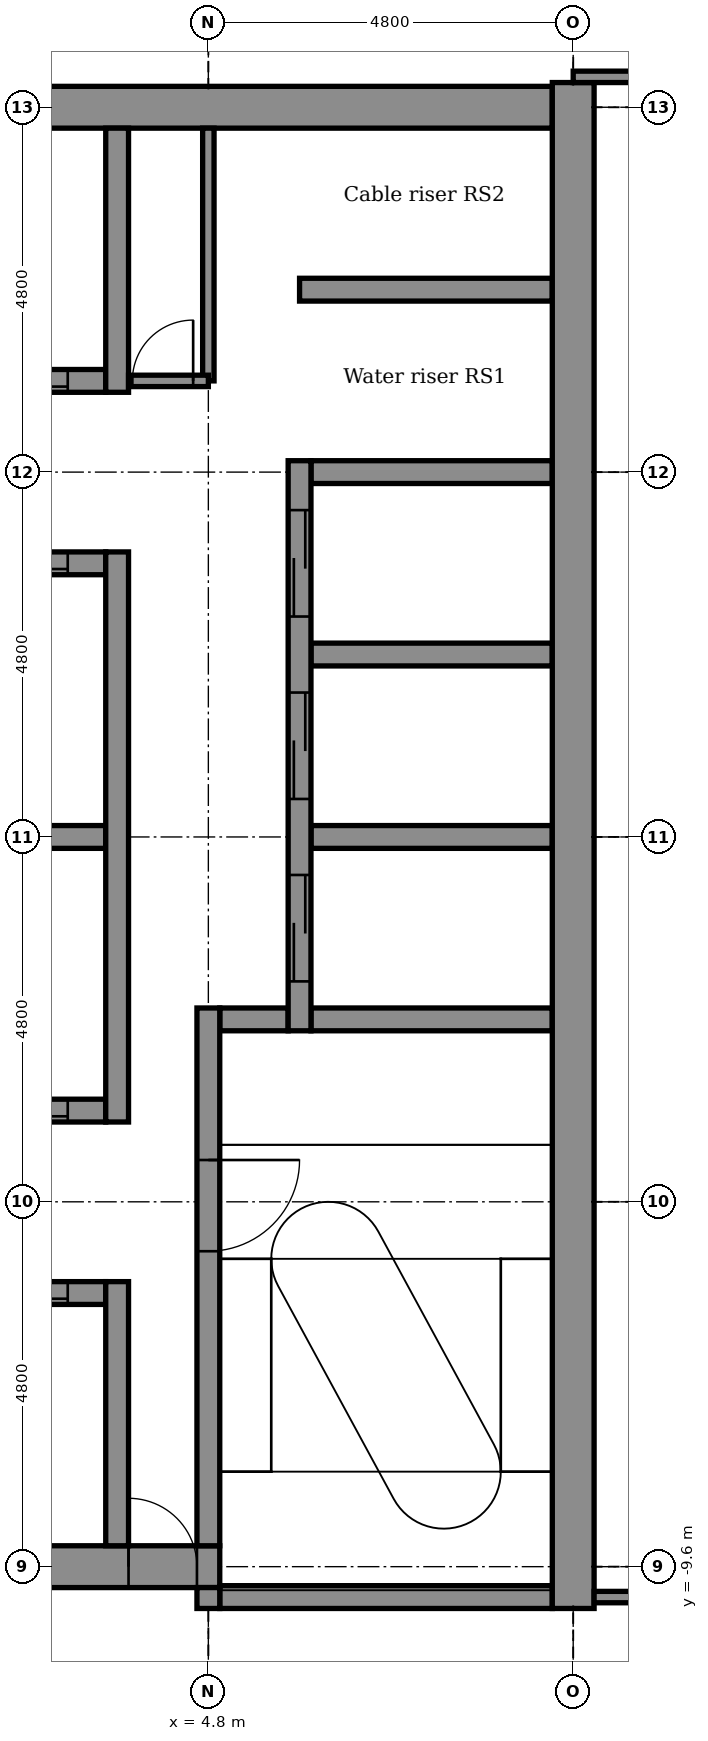
"""IFC4 building model, lengths in metres.
Left out: names, types, materials, properties, quantities, classifications, styles, units other than length and angle.
Written with IfcOpenShell. Run it as: python <this file> out.ifc"""

import sys

from ifc_helpers import new_model, si_unit, direction, frame, frame_2d, origin, place, context, subcontext, project, spatial, rectangle, extrude, element, fill, save


model = new_model("IFC4")
c1 = context("Model", 3, precision=1e-05, world=origin(), true_north=direction((0.0, 1.0)))
c2 = subcontext(c1, "Body", "Model", "MODEL_VIEW")
j1 = project(units=[si_unit("LENGTHUNIT", "METRE"), si_unit("PLANEANGLEUNIT", "RADIAN")], contexts=[c1])
p1 = place(None, origin())
s1 = spatial("IfcSite", under=j1, at=p1, CompositionType="ELEMENT")
p2 = place(p1, origin())
s2 = spatial("IfcBuilding", under=s1, at=p2, CompositionType="ELEMENT")
p3 = place(p2, frame((0.0, 0.0, 226.7)))
s3 = spatial("IfcBuildingStorey", under=s2, at=p3, CompositionType="ELEMENT", Elevation=226.7)
p4 = place(p3, frame((4.95, -10.0, -0.15), z_axis=(0.0, 0.0, 1.0), x_axis=(1.0, 0.0, 0.0)))
e1 = element("IfcWall", 1, at=p4, inside=s3, PredefinedType="STANDARD", context=c2, shape_type="SweptSolid", body=[
    extrude(rectangle(XDim=4.375, YDim=0.3, at=frame_2d((2.188, 0.0))), origin(), (0.0, 0.0, 1.0), 3.9),
])
p5 = place(p3, frame((-5.25, -9.6, -0.15), z_axis=(0.0, 0.0, 1.0), x_axis=(1.0, 0.0, 0.0)))
e2 = element("IfcWall", 2, at=p5, inside=s3, PredefinedType="SHEAR", context=c2, shape_type="SweptSolid", body=[
    extrude(rectangle(XDim=10.2, YDim=0.55, at=frame_2d((5.1, 0.0))), origin(), (0.0, 0.0, 1.0), 3.9),
])
p6 = place(p5, frame((9.0, 0.0, 0.15)))
e3 = element("IfcOpeningElement", 3, at=p6, cuts=e2, PredefinedType="OPENING", context=c2, shape_type="SweptSolid", body=[
    extrude(rectangle(XDim=0.9, YDim=2.1, at=frame_2d((0.45, 1.05))), frame((0.0, 0.285, 0.0), z_axis=(0.0, -1.0, 0.0), x_axis=(1.0, 0.0, 0.0)), (0.0, 0.0, 1.0), 0.57),
])
p7 = place(p3, frame((1.35, -6.0, -0.15), z_axis=(0.0, 0.0, 1.0), x_axis=(1.0, 0.0, 0.0)))
e4 = element("IfcWall", 4, at=p7, inside=s3, PredefinedType="STANDARD", context=c2, shape_type="SweptSolid", body=[
    extrude(rectangle(XDim=2.1, YDim=0.3, at=frame_2d((1.05, 0.0))), origin(), (0.0, 0.0, 1.0), 3.9),
])
p8 = place(p7, frame((0.5, 0.0, 0.15)))
e5 = element("IfcOpeningElement", 5, at=p8, cuts=e4, PredefinedType="OPENING", context=c2, shape_type="SweptSolid", body=[
    extrude(rectangle(XDim=1.1, YDim=2.1, at=frame_2d((0.55, 1.05))), frame((0.0, 0.16, 0.0), z_axis=(0.0, -1.0, 0.0), x_axis=(1.0, 0.0, 0.0)), (0.0, 0.0, 1.0), 0.32),
])
p9 = place(p3, frame((1.35, -3.6, -0.15), z_axis=(0.0, 0.0, 1.0), x_axis=(1.0, 0.0, 0.0)))
e6 = element("IfcWall", 6, at=p9, inside=s3, PredefinedType="STANDARD", context=c2, shape_type="SweptSolid", body=[
    extrude(rectangle(XDim=2.1, YDim=0.3, at=frame_2d((1.05, 0.0))), origin(), (0.0, 0.0, 1.0), 3.9),
])
p10 = place(p9, frame((0.5, 0.0, 0.15)))
e7 = element("IfcOpeningElement", 7, at=p10, cuts=e6, PredefinedType="OPENING", context=c2, shape_type="SweptSolid", body=[
    extrude(rectangle(XDim=1.1, YDim=2.1, at=frame_2d((0.55, 1.05))), frame((0.0, 0.16, 0.0), z_axis=(0.0, -1.0, 0.0), x_axis=(1.0, 0.0, 0.0)), (0.0, 0.0, 1.0), 0.32),
])
p11 = place(p3, frame((4.95, -2.4, -0.15), z_axis=(0.0, 0.0, 1.0), x_axis=(1.0, 0.0, 0.0)))
e8 = element("IfcWall", 8, at=p11, inside=s3, PredefinedType="STANDARD", context=c2, shape_type="SweptSolid", body=[
    extrude(rectangle(XDim=0.9, YDim=0.3, at=frame_2d((0.45, 0.0))), origin(), (0.0, 0.0, 1.0), 3.9),
])
p12 = place(p3, frame((6.15, -2.4, -0.15), z_axis=(0.0, 0.0, 1.0), x_axis=(1.0, 0.0, 0.0)))
e9 = element("IfcWall", 9, at=p12, inside=s3, PredefinedType="STANDARD", context=c2, shape_type="SweptSolid", body=[
    extrude(rectangle(XDim=3.175, YDim=0.3, at=frame_2d((1.587, 0.0))), origin(), (0.0, 0.0, 1.0), 3.9),
])
p13 = place(p3, frame((1.35, 0.0, -0.15), z_axis=(0.0, 0.0, 1.0), x_axis=(1.0, 0.0, 0.0)))
e10 = element("IfcWall", 10, at=p13, inside=s3, PredefinedType="STANDARD", context=c2, shape_type="SweptSolid", body=[
    extrude(rectangle(XDim=2.1, YDim=0.3, at=frame_2d((1.05, 0.0))), origin(), (0.0, 0.0, 1.0), 3.9),
])
for number, where, z_axis, x_axis in (
    (11, (6.15, 0.0, -0.15), (0.0, 0.0, 1.0), (1.0, 0.0, 0.0)),
    (12, (6.15, 2.4, -0.15), (0.0, 0.0, 1.0), (1.0, 0.0, 0.0)),
):
    element("IfcWall", number, at=place(p3, frame(where, z_axis=z_axis, x_axis=x_axis)), inside=s3, PredefinedType="STANDARD", context=c2, shape_type="SweptSolid", body=[
        extrude(rectangle(XDim=3.175, YDim=0.3, at=frame_2d((1.587, 0.0))), origin(), (0.0, 0.0, 1.0), 3.9),
    ])
p14 = place(p3, frame((1.35, 3.6, -0.15), z_axis=(0.0, 0.0, 1.0), x_axis=(1.0, 0.0, 0.0)))
e13 = element("IfcWall", 13, at=p14, inside=s3, PredefinedType="STANDARD", context=c2, shape_type="SweptSolid", body=[
    extrude(rectangle(XDim=2.1, YDim=0.3, at=frame_2d((1.05, 0.0))), origin(), (0.0, 0.0, 1.0), 3.9),
])
p15 = place(p14, frame((0.5, 0.0, 0.15)))
e14 = element("IfcOpeningElement", 14, at=p15, cuts=e13, PredefinedType="OPENING", context=c2, shape_type="SweptSolid", body=[
    extrude(rectangle(XDim=1.1, YDim=2.1, at=frame_2d((0.55, 1.05))), frame((0.0, 0.16, 0.0), z_axis=(0.0, -1.0, 0.0), x_axis=(1.0, 0.0, 0.0)), (0.0, 0.0, 1.0), 0.32),
])
p16 = place(p3, frame((6.15, 4.8, -0.15), z_axis=(0.0, 0.0, 1.0), x_axis=(1.0, 0.0, 0.0)))
e15 = element("IfcWall", 15, at=p16, inside=s3, PredefinedType="STANDARD", context=c2, shape_type="SweptSolid", body=[
    extrude(rectangle(XDim=3.175, YDim=0.3, at=frame_2d((1.587, 0.0))), origin(), (0.0, 0.0, 1.0), 3.9),
])
p17 = place(p3, frame((1.35, 6.0, -0.15), z_axis=(0.0, 0.0, 1.0), x_axis=(1.0, 0.0, 0.0)))
e16 = element("IfcWall", 16, at=p17, inside=s3, PredefinedType="STANDARD", context=c2, shape_type="SweptSolid", body=[
    extrude(rectangle(XDim=2.1, YDim=0.3, at=frame_2d((1.05, 0.0))), origin(), (0.0, 0.0, 1.0), 3.9),
])
p18 = place(p17, frame((0.5, 0.0, 0.15)))
e17 = element("IfcOpeningElement", 17, at=p18, cuts=e16, PredefinedType="OPENING", context=c2, shape_type="SweptSolid", body=[
    extrude(rectangle(XDim=1.1, YDim=2.1, at=frame_2d((0.55, 1.05))), frame((0.0, 0.16, 0.0), z_axis=(0.0, -1.0, 0.0), x_axis=(1.0, 0.0, 0.0)), (0.0, 0.0, 1.0), 0.32),
])
p19 = place(p3, frame((6.0, 7.2, -0.15), z_axis=(0.0, 0.0, 1.0), x_axis=(1.0, 0.0, 0.0)))
e18 = element("IfcWall", 18, at=p19, inside=s3, PredefinedType="STANDARD", context=c2, shape_type="SweptSolid", body=[
    extrude(rectangle(XDim=3.325, YDim=0.3, at=frame_2d((1.663, 0.0))), origin(), (0.0, 0.0, 1.0), 3.9),
])
p20 = place(p3, frame((-5.25, 9.6, -0.15), z_axis=(0.0, 0.0, 1.0), x_axis=(1.0, 0.0, 0.0)))
e19 = element("IfcWall", 19, at=p20, inside=s3, PredefinedType="SHEAR", context=c2, shape_type="SweptSolid", body=[
    extrude(rectangle(XDim=14.575, YDim=0.55, at=frame_2d((7.288, 0.0))), origin(), (0.0, 0.0, 1.0), 3.9),
])
p21 = place(p20, frame((0.6, 0.0, 0.15)))
e20 = element("IfcOpeningElement", 20, at=p21, cuts=e19, PredefinedType="OPENING", context=c2, shape_type="SweptSolid", body=[
    extrude(rectangle(XDim=0.9, YDim=2.1, at=frame_2d((0.45, 1.05))), frame((0.0, 0.285, 0.0), z_axis=(0.0, -1.0, 0.0), x_axis=(1.0, 0.0, 0.0)), (0.0, 0.0, 1.0), 0.57),
])
p22 = place(p3, frame((3.6, -9.325, -0.15), z_axis=(0.0, 0.0, 1.0), x_axis=(0.0, 1.0, 0.0)))
e21 = element("IfcWall", 21, at=p22, inside=s3, PredefinedType="STANDARD", context=c2, shape_type="SweptSolid", body=[
    extrude(rectangle(XDim=3.475, YDim=0.3, at=frame_2d((1.737, 0.0))), origin(), (0.0, 0.0, 1.0), 3.9),
])
p23 = place(p3, frame((3.6, -3.75, -0.15), z_axis=(0.0, 0.0, 1.0), x_axis=(0.0, 1.0, 0.0)))
e22 = element("IfcWall", 22, at=p23, inside=s3, PredefinedType="STANDARD", context=c2, shape_type="SweptSolid", body=[
    extrude(rectangle(XDim=7.5, YDim=0.3, at=frame_2d((3.75, 0.0))), origin(), (0.0, 0.0, 1.0), 3.9),
])
p24 = place(p3, frame((3.6, 5.85, -0.15), z_axis=(0.0, 0.0, 1.0), x_axis=(0.0, 1.0, 0.0)))
e23 = element("IfcWall", 23, at=p24, inside=s3, PredefinedType="STANDARD", context=c2, shape_type="SweptSolid", body=[
    extrude(rectangle(XDim=3.475, YDim=0.3, at=frame_2d((1.737, 0.0))), origin(), (0.0, 0.0, 1.0), 3.9),
])
p25 = place(p3, frame((4.8, -10.15, -0.15), z_axis=(0.0, 0.0, 1.0), x_axis=(0.0, 1.0, 0.0)))
e24 = element("IfcWall", 24, at=p25, inside=s3, PredefinedType="STANDARD", context=c2, shape_type="SweptSolid", body=[
    extrude(rectangle(XDim=0.275, YDim=0.3, at=frame_2d((0.137, 0.0))), origin(), (0.0, 0.0, 1.0), 3.9),
])
p26 = place(p3, frame((4.8, -9.325, -0.15), z_axis=(0.0, 0.0, 1.0), x_axis=(0.0, 1.0, 0.0)))
e25 = element("IfcWall", 25, at=p26, inside=s3, PredefinedType="STANDARD", context=c2, shape_type="SweptSolid", body=[
    extrude(rectangle(XDim=7.075, YDim=0.3, at=frame_2d((3.538, 0.0))), origin(), (0.0, 0.0, 1.0), 3.9),
])
p27 = place(p26, frame((3.875, 0.0, 0.15)))
e26 = element("IfcOpeningElement", 26, at=p27, cuts=e25, PredefinedType="OPENING", context=c2, shape_type="SweptSolid", body=[
    extrude(rectangle(XDim=1.2, YDim=2.1, at=frame_2d((0.6, 1.05))), frame((0.0, 0.16, 0.0), z_axis=(0.0, -1.0, 0.0), x_axis=(1.0, 0.0, 0.0)), (0.0, 0.0, 1.0), 0.32),
])
p28 = place(p3, frame((6.0, -2.55, -0.15), z_axis=(0.0, 0.0, 1.0), x_axis=(0.0, 1.0, 0.0)))
e27 = element("IfcWall", 27, at=p28, inside=s3, PredefinedType="STANDARD", context=c2, shape_type="SweptSolid", body=[
    extrude(rectangle(XDim=7.5, YDim=0.3, at=frame_2d((3.75, 0.0))), origin(), (0.0, 0.0, 1.0), 3.9),
])
p29 = place(p28, frame((0.65, 0.0, 0.15)))
e28 = element("IfcOpeningElement", 28, at=p29, cuts=e27, PredefinedType="OPENING", context=c2, shape_type="SweptSolid", body=[
    extrude(rectangle(XDim=1.4, YDim=2.1, at=frame_2d((0.7, 1.05))), frame((0.0, 0.16, 0.0), z_axis=(0.0, -1.0, 0.0), x_axis=(1.0, 0.0, 0.0)), (0.0, 0.0, 1.0), 0.32),
])
p30 = place(p28, frame((3.05, 0.0, 0.15)))
e29 = element("IfcOpeningElement", 29, at=p30, cuts=e27, PredefinedType="OPENING", context=c2, shape_type="SweptSolid", body=[
    extrude(rectangle(XDim=1.4, YDim=2.1, at=frame_2d((0.7, 1.05))), frame((0.0, 0.16, 0.0), z_axis=(0.0, -1.0, 0.0), x_axis=(1.0, 0.0, 0.0)), (0.0, 0.0, 1.0), 0.32),
])
p31 = place(p28, frame((5.45, 0.0, 0.15)))
e30 = element("IfcOpeningElement", 30, at=p31, cuts=e27, PredefinedType="OPENING", context=c2, shape_type="SweptSolid", body=[
    extrude(rectangle(XDim=1.4, YDim=2.1, at=frame_2d((0.7, 1.05))), frame((0.0, 0.16, 0.0), z_axis=(0.0, -1.0, 0.0), x_axis=(1.0, 0.0, 0.0)), (0.0, 0.0, 1.0), 0.32),
])
p32 = place(p3, frame((9.6, -10.15, -0.15), z_axis=(0.0, 0.0, 1.0), x_axis=(0.0, 1.0, 0.0)))
e31 = element("IfcWall", 31, at=p32, inside=s3, PredefinedType="SHEAR", context=c2, shape_type="SweptSolid", body=[
    extrude(rectangle(XDim=20.075, YDim=0.55, at=frame_2d((10.038, 0.0))), origin(), (0.0, 0.0, 1.0), 3.9),
])
p33 = place(p3, frame((4.8, 6.0, 0.0), z_axis=(0.0, 0.0, 1.0), x_axis=(0.0, 1.0, 0.0)))
e32 = element("IfcWall", 32, at=p33, inside=s3, PredefinedType="PARTITIONING", context=c2, shape_type="SweptSolid", body=[
    extrude(rectangle(XDim=3.325, YDim=0.15, at=frame_2d((1.663, 0.0))), origin(), (0.0, 0.0, 1.0), 3.75),
])
p34 = place(p3, frame((9.875, -10.0, 0.0), z_axis=(0.0, 0.0, 1.0), x_axis=(1.0, 0.0, 0.0)))
e33 = element("IfcWall", 33, at=p34, inside=s3, PredefinedType="PARTITIONING", context=c2, shape_type="SweptSolid", body=[
    extrude(rectangle(XDim=4.68, YDim=0.15, at=frame_2d((2.34, 0.0))), origin(), (0.0, 0.0, 1.0), 3.75),
])
p35 = place(p3, frame((3.75, 6.0, 0.0), z_axis=(0.0, 0.0, 1.0), x_axis=(1.0, 0.0, 0.0)))
e34 = element("IfcWall", 34, at=p35, inside=s3, PredefinedType="PARTITIONING", context=c2, shape_type="SweptSolid", body=[
    extrude(rectangle(XDim=1.05, YDim=0.15, at=frame_2d((0.525, 0.0))), origin(), (0.0, 0.0, 1.0), 3.75),
])
p36 = place(p35, frame((0.05, 0.0, 0.0)))
e35 = element("IfcOpeningElement", 35, at=p36, cuts=e34, PredefinedType="OPENING", context=c2, shape_type="SweptSolid", body=[
    extrude(rectangle(XDim=0.8, YDim=2.1, at=frame_2d((0.4, 1.05))), frame((0.0, 0.085, 0.0), z_axis=(0.0, -1.0, 0.0), x_axis=(1.0, 0.0, 0.0)), (0.0, 0.0, 1.0), 0.17),
])
p37 = place(p3, frame((9.6, 10.0, 0.0), z_axis=(0.0, 0.0, 1.0), x_axis=(1.0, 0.0, 0.0)))
e36 = element("IfcWall", 36, at=p37, inside=s3, PredefinedType="PARTITIONING", context=c2, shape_type="SweptSolid", body=[
    extrude(rectangle(XDim=4.955, YDim=0.15, at=frame_2d((2.477, 0.0))), origin(), (0.0, 0.0, 1.0), 3.75),
])
p38 = place(p37, frame((1.239, 0.0, 0.0)))
e37 = element("IfcOpeningElement", 37, at=p38, cuts=e36, PredefinedType="OPENING", context=c2, shape_type="SweptSolid", body=[
    extrude(rectangle(XDim=1.8, YDim=2.1, at=frame_2d((0.9, 1.05))), frame((0.0, 0.085, 0.0), z_axis=(0.0, -1.0, 0.0), x_axis=(1.0, 0.0, 0.0)), (0.0, 0.0, 1.0), 0.17),
])
p39 = place(p36, origin())
e38 = element("IfcDoor", 38, at=p39, inside=s3, OperationType="SINGLE_SWING_RIGHT", PredefinedType="DOOR", context=c2, shape_type="SweptSolid", body=[
    extrude(rectangle(XDim=0.8, YDim=2.1, at=frame_2d((0.4, 1.05))), frame((0.0, 0.025, 0.0), z_axis=(0.0, -1.0, 0.0), x_axis=(1.0, 0.0, 0.0)), (0.0, 0.0, 1.0), 0.05),
])
fill(e35, e38)
p40 = place(p29, origin())
e39 = element("IfcDoor", 39, at=p40, inside=s3, OperationType="DOUBLE_DOOR_SLIDING", PredefinedType="DOOR", context=c2, shape_type="SweptSolid", body=[
    extrude(rectangle(XDim=1.4, YDim=2.1, at=frame_2d((0.7, 1.05))), frame((0.0, 0.025, 0.0), z_axis=(0.0, -1.0, 0.0), x_axis=(1.0, 0.0, 0.0)), (0.0, 0.0, 1.0), 0.05),
])
fill(e28, e39)
p41 = place(p30, origin())
e40 = element("IfcDoor", 40, at=p41, inside=s3, OperationType="DOUBLE_DOOR_SLIDING", PredefinedType="DOOR", context=c2, shape_type="SweptSolid", body=[
    extrude(rectangle(XDim=1.4, YDim=2.1, at=frame_2d((0.7, 1.05))), frame((0.0, 0.025, 0.0), z_axis=(0.0, -1.0, 0.0), x_axis=(1.0, 0.0, 0.0)), (0.0, 0.0, 1.0), 0.05),
])
fill(e29, e40)
p42 = place(p31, origin())
e41 = element("IfcDoor", 41, at=p42, inside=s3, OperationType="DOUBLE_DOOR_SLIDING", PredefinedType="DOOR", context=c2, shape_type="SweptSolid", body=[
    extrude(rectangle(XDim=1.4, YDim=2.1, at=frame_2d((0.7, 1.05))), frame((0.0, 0.025, 0.0), z_axis=(0.0, -1.0, 0.0), x_axis=(1.0, 0.0, 0.0)), (0.0, 0.0, 1.0), 0.05),
])
fill(e30, e41)
p43 = place(p18, origin())
e42 = element("IfcDoor", 42, at=p43, inside=s3, OperationType="DOUBLE_DOOR_SLIDING", PredefinedType="DOOR", context=c2, shape_type="SweptSolid", body=[
    extrude(rectangle(XDim=1.1, YDim=2.1, at=frame_2d((0.55, 1.05))), frame((0.0, 0.025, 0.0), z_axis=(0.0, -1.0, 0.0), x_axis=(1.0, 0.0, 0.0)), (0.0, 0.0, 1.0), 0.05),
])
fill(e17, e42)
p44 = place(p15, origin())
e43 = element("IfcDoor", 43, at=p44, inside=s3, OperationType="DOUBLE_DOOR_SLIDING", PredefinedType="DOOR", context=c2, shape_type="SweptSolid", body=[
    extrude(rectangle(XDim=1.1, YDim=2.1, at=frame_2d((0.55, 1.05))), frame((0.0, 0.025, 0.0), z_axis=(0.0, -1.0, 0.0), x_axis=(1.0, 0.0, 0.0)), (0.0, 0.0, 1.0), 0.05),
])
fill(e14, e43)
p45 = place(p10, origin())
e44 = element("IfcDoor", 44, at=p45, inside=s3, OperationType="DOUBLE_DOOR_SLIDING", PredefinedType="DOOR", context=c2, shape_type="SweptSolid", body=[
    extrude(rectangle(XDim=1.1, YDim=2.1, at=frame_2d((0.55, 1.05))), frame((0.0, 0.025, 0.0), z_axis=(0.0, -1.0, 0.0), x_axis=(1.0, 0.0, 0.0)), (0.0, 0.0, 1.0), 0.05),
])
fill(e7, e44)
p46 = place(p8, origin())
e45 = element("IfcDoor", 45, at=p46, inside=s3, OperationType="DOUBLE_DOOR_SLIDING", PredefinedType="DOOR", context=c2, shape_type="SweptSolid", body=[
    extrude(rectangle(XDim=1.1, YDim=2.1, at=frame_2d((0.55, 1.05))), frame((0.0, 0.025, 0.0), z_axis=(0.0, -1.0, 0.0), x_axis=(1.0, 0.0, 0.0)), (0.0, 0.0, 1.0), 0.05),
])
fill(e5, e45)
p47 = place(p27, frame((1.2, 0.0, 0.0), z_axis=(0.0, 0.0, 1.0), x_axis=(-1.0, 0.0, 0.0)))
e46 = element("IfcDoor", 46, at=p47, inside=s3, OperationType="SINGLE_SWING_RIGHT", PredefinedType="DOOR", context=c2, shape_type="SweptSolid", body=[
    extrude(rectangle(XDim=1.2, YDim=2.1, at=frame_2d((0.6, 1.05))), frame((0.0, 0.025, 0.0), z_axis=(0.0, -1.0, 0.0), x_axis=(1.0, 0.0, 0.0)), (0.0, 0.0, 1.0), 0.05),
])
fill(e26, e46)
p48 = place(p6, origin())
e47 = element("IfcDoor", 47, at=p48, inside=s3, OperationType="SINGLE_SWING_LEFT", PredefinedType="DOOR", context=c2, shape_type="SweptSolid", body=[
    extrude(rectangle(XDim=0.9, YDim=2.1, at=frame_2d((0.45, 1.05))), frame((0.0, 0.025, 0.0), z_axis=(0.0, -1.0, 0.0), x_axis=(1.0, 0.0, 0.0)), (0.0, 0.0, 1.0), 0.05),
])
fill(e3, e47)
save(model, sys.argv[1])
